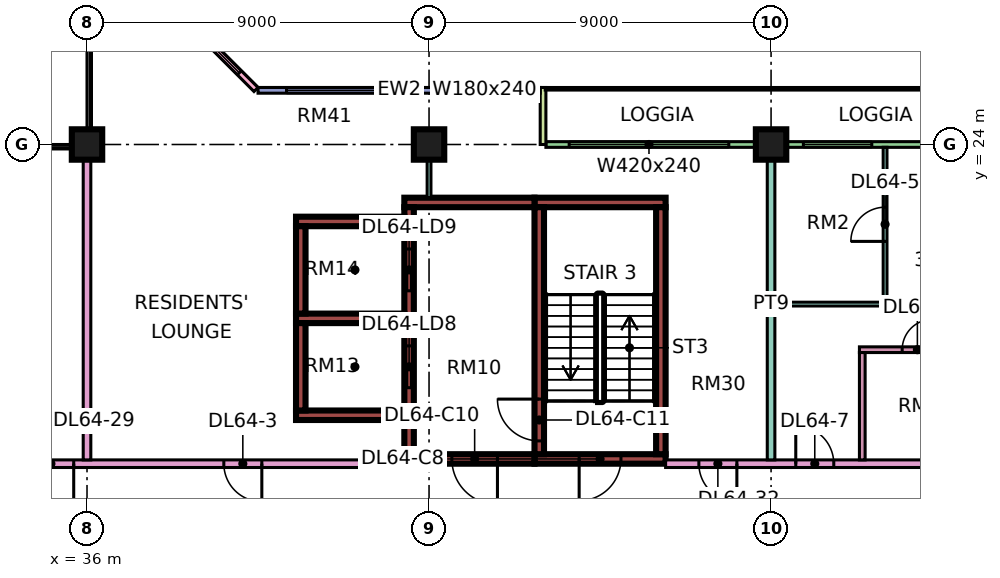
"""IFC4 building model, lengths in metres.
Left out: names, types, materials, properties, quantities, classifications, styles, units other than length and angle.
Written with IfcOpenShell. Run it as: python <this file> out.ifc"""

import sys

from ifc_helpers import new_model, si_unit, direction, frame, frame_2d, origin, origin_2d, place, context, subcontext, project, spatial, rectangle, extrude, element, fill, save


model = new_model("IFC4")
c1 = context("Model", 3, precision=1e-05, world=origin(), true_north=direction((0.0, 1.0)))
c2 = subcontext(c1, "Body", "Model", "MODEL_VIEW")
j1 = project(units=[si_unit("LENGTHUNIT", "METRE"), si_unit("PLANEANGLEUNIT", "RADIAN")], contexts=[c1])
p1 = place(None, origin())
s1 = spatial("IfcSite", under=j1, at=p1, CompositionType="ELEMENT")
p2 = place(p1, origin())
s2 = spatial("IfcBuilding", under=s1, at=p2, CompositionType="ELEMENT")
p3 = place(p2, frame((0.0, 0.0, 277.15)))
s3 = spatial("IfcBuildingStorey", under=s2, at=p3, CompositionType="ELEMENT", Elevation=277.15)
for number, where, z_axis, x_axis in (
    (1, (36.0, 24.0, 0.0), (0.0, 0.0, 1.0), (1.0, 0.0, 0.0)),
    (2, (45.0, 24.0, 0.0), (0.0, 0.0, 1.0), (1.0, 0.0, 0.0)),
    (3, (54.0, 24.0, 0.0), (0.0, 0.0, 1.0), (1.0, 0.0, 0.0)),
):
    element("IfcColumn", number, at=place(p3, frame(where, z_axis=z_axis, x_axis=x_axis)), inside=s3, PredefinedType="COLUMN", context=c2, shape_type="SweptSolid", body=[
        extrude(rectangle(XDim=0.8, YDim=0.8, at=origin_2d()), origin(), (0.0, 0.0, 1.0), 3.75),
    ])
p4 = place(p3, frame((47.775, 15.725, 0.0), z_axis=(0.0, 0.0, 1.0), x_axis=(1.0, 0.0, 0.0)))
e4 = element("IfcWall", 4, at=p4, inside=s3, PredefinedType="SHEAR", context=c2, shape_type="SweptSolid", body=[
    extrude(rectangle(XDim=3.45, YDim=0.25, at=frame_2d((1.725, 0.0))), origin(), (0.0, 0.0, 1.0), 3.75),
])
p5 = place(p4, frame((1.175, 0.0, 0.0)))
e5 = element("IfcOpeningElement", 5, at=p5, cuts=e4, PredefinedType="OPENING", context=c2, shape_type="SweptSolid", body=[
    extrude(rectangle(XDim=1.1, YDim=2.2, at=frame_2d((0.55, 1.1))), frame((0.0, 0.135, 0.0), z_axis=(0.0, -1.0, 0.0), x_axis=(1.0, 0.0, 0.0)), (0.0, 0.0, 1.0), 0.27),
])
p6 = place(p3, frame((47.775, 22.475, 0.0), z_axis=(0.0, 0.0, 1.0), x_axis=(1.0, 0.0, 0.0)))
e6 = element("IfcWall", 6, at=p6, inside=s3, PredefinedType="SHEAR", context=c2, shape_type="SweptSolid", body=[
    extrude(rectangle(XDim=3.45, YDim=0.25, at=frame_2d((1.725, 0.0))), origin(), (0.0, 0.0, 1.0), 3.75),
])
p7 = place(p3, frame((47.9, 15.85, 0.0), z_axis=(0.0, 0.0, 1.0), x_axis=(0.0, 1.0, 0.0)))
e7 = element("IfcWall", 7, at=p7, inside=s3, PredefinedType="SHEAR", context=c2, shape_type="SweptSolid", body=[
    extrude(rectangle(XDim=6.5, YDim=0.25, at=frame_2d((3.25, 0.0))), origin(), (0.0, 0.0, 1.0), 3.75),
])
p8 = place(p7, frame((0.35, 0.0, 0.0)))
e8 = element("IfcOpeningElement", 8, at=p8, cuts=e7, PredefinedType="OPENING", context=c2, shape_type="SweptSolid", body=[
    extrude(rectangle(XDim=1.1, YDim=2.2, at=frame_2d((0.55, 1.1))), frame((0.0, 0.135, 0.0), z_axis=(0.0, -1.0, 0.0), x_axis=(1.0, 0.0, 0.0)), (0.0, 0.0, 1.0), 0.27),
])
p9 = place(p3, frame((51.1, 15.85, 0.0), z_axis=(0.0, 0.0, 1.0), x_axis=(0.0, 1.0, 0.0)))
e9 = element("IfcWall", 9, at=p9, inside=s3, PredefinedType="SHEAR", context=c2, shape_type="SweptSolid", body=[
    extrude(rectangle(XDim=6.5, YDim=0.25, at=frame_2d((3.25, 0.0))), origin(), (0.0, 0.0, 1.0), 3.75),
])
p10 = place(p3, frame((44.35, 15.725, 0.0), z_axis=(0.0, 0.0, 1.0), x_axis=(1.0, 0.0, 0.0)))
e10 = element("IfcWall", 10, at=p10, inside=s3, PredefinedType="SHEAR", context=c2, shape_type="SweptSolid", body=[
    extrude(rectangle(XDim=3.425, YDim=0.25, at=frame_2d((1.712, 0.0))), origin(), (0.0, 0.0, 1.0), 3.75),
])
p11 = place(p10, frame((1.25, 0.0, 0.0)))
e11 = element("IfcOpeningElement", 11, at=p11, cuts=e10, PredefinedType="OPENING", context=c2, shape_type="SweptSolid", body=[
    extrude(rectangle(XDim=1.2, YDim=2.2, at=frame_2d((0.6, 1.1))), frame((0.0, 0.135, 0.0), z_axis=(0.0, -1.0, 0.0), x_axis=(1.0, 0.0, 0.0)), (0.0, 0.0, 1.0), 0.27),
])
p12 = place(p3, frame((44.35, 22.475, 0.0), z_axis=(0.0, 0.0, 1.0), x_axis=(1.0, 0.0, 0.0)))
e12 = element("IfcWall", 12, at=p12, inside=s3, PredefinedType="SHEAR", context=c2, shape_type="SweptSolid", body=[
    extrude(rectangle(XDim=3.425, YDim=0.25, at=frame_2d((1.712, 0.0))), origin(), (0.0, 0.0, 1.0), 3.75),
])
p13 = place(p3, frame((44.475, 15.85, 0.0), z_axis=(0.0, 0.0, 1.0), x_axis=(0.0, 1.0, 0.0)))
e13 = element("IfcWall", 13, at=p13, inside=s3, PredefinedType="SHEAR", context=c2, shape_type="SweptSolid", body=[
    extrude(rectangle(XDim=6.5, YDim=0.25, at=frame_2d((3.25, 0.0))), origin(), (0.0, 0.0, 1.0), 3.75),
])
p14 = place(p13, frame((1.75, 0.0, 0.0)))
e14 = element("IfcOpeningElement", 14, at=p14, cuts=e13, PredefinedType="OPENING", context=c2, shape_type="SweptSolid", body=[
    extrude(rectangle(XDim=1.1, YDim=2.2, at=frame_2d((0.55, 1.1))), frame((0.0, 0.135, 0.0), z_axis=(0.0, -1.0, 0.0), x_axis=(1.0, 0.0, 0.0)), (0.0, 0.0, 1.0), 0.27),
])
p15 = place(p13, frame((4.3, 0.0, 0.0)))
e15 = element("IfcOpeningElement", 15, at=p15, cuts=e13, PredefinedType="OPENING", context=c2, shape_type="SweptSolid", body=[
    extrude(rectangle(XDim=1.1, YDim=2.2, at=frame_2d((0.55, 1.1))), frame((0.0, 0.135, 0.0), z_axis=(0.0, -1.0, 0.0), x_axis=(1.0, 0.0, 0.0)), (0.0, 0.0, 1.0), 0.27),
])
for number, where, z_axis, x_axis in (
    (16, (41.5, 16.875, 0.0), (0.0, 0.0, 1.0), (1.0, 0.0, 0.0)),
    (17, (41.5, 19.425, 0.0), (0.0, 0.0, 1.0), (1.0, 0.0, 0.0)),
    (18, (41.5, 21.975, 0.0), (0.0, 0.0, 1.0), (1.0, 0.0, 0.0)),
):
    element("IfcWall", number, at=place(p3, frame(where, z_axis=z_axis, x_axis=x_axis)), inside=s3, PredefinedType="SHEAR", context=c2, shape_type="SweptSolid", body=[
        extrude(rectangle(XDim=2.85, YDim=0.25, at=frame_2d((1.425, 0.0))), origin(), (0.0, 0.0, 1.0), 3.75),
    ])
for number, where, z_axis, x_axis in (
    (19, (41.625, 17.0, 0.0), (0.0, 0.0, 1.0), (0.0, 1.0, 0.0)),
    (20, (41.625, 19.55, 0.0), (0.0, 0.0, 1.0), (0.0, 1.0, 0.0)),
):
    element("IfcWall", number, at=place(p3, frame(where, z_axis=z_axis, x_axis=x_axis)), inside=s3, PredefinedType="SHEAR", context=c2, shape_type="SweptSolid", body=[
        extrude(rectangle(XDim=2.3, YDim=0.25, at=frame_2d((1.15, 0.0))), origin(), (0.0, 0.0, 1.0), 3.75),
    ])
p16 = place(p3, frame((61.425, 24.0, 0.0), z_axis=(0.0, 0.0, 1.0), x_axis=(-1.0, 0.0, 0.0)))
e21 = element("IfcWall", 21, at=p16, inside=s3, PredefinedType="SOLIDWALL", context=c2, shape_type="SweptSolid", body=[
    extrude(rectangle(XDim=13.35, YDim=0.15, at=frame_2d((6.675, 0.0))), origin(), (0.0, 0.0, 1.0), 3.35),
])
p17 = place(p16, frame((1.312, 0.0, 0.0)))
e22 = element("IfcOpeningElement", 22, at=p17, cuts=e21, PredefinedType="OPENING", context=c2, shape_type="SweptSolid", body=[
    extrude(rectangle(XDim=1.8, YDim=2.4, at=frame_2d((0.9, 1.2))), frame((0.0, 0.085, 0.0), z_axis=(0.0, -1.0, 0.0), x_axis=(1.0, 0.0, 0.0)), (0.0, 0.0, 1.0), 0.17),
])
p18 = place(p16, frame((4.775, 0.0, 0.45)))
e23 = element("IfcOpeningElement", 23, at=p18, cuts=e21, PredefinedType="OPENING", context=c2, shape_type="SweptSolid", body=[
    extrude(rectangle(XDim=1.8, YDim=2.4, at=frame_2d((0.9, 1.2))), frame((0.0, 0.085, 0.0), z_axis=(0.0, -1.0, 0.0), x_axis=(1.0, 0.0, 0.0)), (0.0, 0.0, 1.0), 0.17),
])
p19 = place(p16, frame((8.538, 0.0, 0.45)))
e24 = element("IfcOpeningElement", 24, at=p19, cuts=e21, PredefinedType="OPENING", context=c2, shape_type="SweptSolid", body=[
    extrude(rectangle(XDim=4.2, YDim=2.4, at=frame_2d((2.1, 1.2))), frame((0.0, 0.085, 0.0), z_axis=(0.0, -1.0, 0.0), x_axis=(1.0, 0.0, 0.0)), (0.0, 0.0, 1.0), 0.17),
])
p20 = place(p3, frame((48.0, 25.5, 0.0), z_axis=(0.0, 0.0, 1.0), x_axis=(0.0, -1.0, 0.0)))
e25 = element("IfcWall", 25, at=p20, inside=s3, PredefinedType="SOLIDWALL", context=c2, shape_type="SweptSolid", body=[
    extrude(rectangle(XDim=1.5, YDim=0.15, at=frame_2d((0.75, 0.0))), origin(), (0.0, 0.0, 1.0), 3.35),
])
p21 = place(p3, frame((47.925, 25.425, 0.0), z_axis=(0.0, 0.0, 1.0), x_axis=(-1.0, 0.0, 0.0)))
e26 = element("IfcWall", 26, at=p21, inside=s3, PredefinedType="SOLIDWALL", context=c2, shape_type="SweptSolid", body=[
    extrude(rectangle(XDim=7.425, YDim=0.15, at=frame_2d((3.712, 0.0))), origin(), (0.0, 0.0, 1.0), 3.35),
])
p22 = place(p21, frame((0.562, 0.0, 0.45)))
e27 = element("IfcOpeningElement", 27, at=p22, cuts=e26, PredefinedType="OPENING", context=c2, shape_type="SweptSolid", body=[
    extrude(rectangle(XDim=1.8, YDim=2.4, at=frame_2d((0.9, 1.2))), frame((0.0, 0.085, 0.0), z_axis=(0.0, -1.0, 0.0), x_axis=(1.0, 0.0, 0.0)), (0.0, 0.0, 1.0), 0.17),
])
p23 = place(p21, frame((3.675, 0.0, 0.45)))
e28 = element("IfcOpeningElement", 28, at=p23, cuts=e26, PredefinedType="OPENING", context=c2, shape_type="SweptSolid", body=[
    extrude(rectangle(XDim=3.0, YDim=2.4, at=frame_2d((1.5, 1.2))), frame((0.0, 0.085, 0.0), z_axis=(0.0, -1.0, 0.0), x_axis=(1.0, 0.0, 0.0)), (0.0, 0.0, 1.0), 0.17),
])
p24 = place(p3, frame((40.447, 25.447, 0.0), z_axis=(0.0, 0.0, 1.0), x_axis=(-0.707106781187, 0.707106781187, 0.0)))
e29 = element("IfcWall", 29, at=p24, inside=s3, PredefinedType="SOLIDWALL", context=c2, shape_type="SweptSolid", body=[
    extrude(rectangle(XDim=4.243, YDim=0.15, at=frame_2d((2.121, 0.0))), origin(), (0.0, 0.0, 1.0), 3.35),
])
p25 = place(p24, frame((0.621, 0.0, 0.45)))
e30 = element("IfcOpeningElement", 30, at=p25, cuts=e29, PredefinedType="OPENING", context=c2, shape_type="SweptSolid", body=[
    extrude(rectangle(XDim=3.0, YDim=2.4, at=frame_2d((1.5, 1.2))), frame((0.0, 0.085, 0.0), z_axis=(0.0, -1.0, 0.0), x_axis=(1.0, 0.0, 0.0)), (0.0, 0.0, 1.0), 0.17),
])
p26 = place(p3, frame((34.0, 15.6, 0.0), z_axis=(0.0, 0.0, 1.0), x_axis=(1.0, 0.0, 0.0)))
e31 = element("IfcWall", 31, at=p26, inside=s3, PredefinedType="PARTITIONING", context=c2, shape_type="SweptSolid", body=[
    extrude(rectangle(XDim=10.35, YDim=0.2, at=frame_2d((5.175, 0.0))), origin(), (0.0, 0.0, 1.0), 3.35),
])
p27 = place(p26, frame((5.6, 0.0, 0.0)))
e32 = element("IfcOpeningElement", 32, at=p27, cuts=e31, PredefinedType="OPENING", context=c2, shape_type="SweptSolid", body=[
    extrude(rectangle(XDim=1.0, YDim=2.1, at=frame_2d((0.5, 1.05))), frame((0.0, 0.11, 0.0), z_axis=(0.0, -1.0, 0.0), x_axis=(1.0, 0.0, 0.0)), (0.0, 0.0, 1.0), 0.22),
])
p28 = place(p26, frame((0.45, 0.0, 0.0)))
e33 = element("IfcOpeningElement", 33, at=p28, cuts=e31, PredefinedType="OPENING", context=c2, shape_type="SweptSolid", body=[
    extrude(rectangle(XDim=1.2, YDim=2.1, at=frame_2d((0.6, 1.05))), frame((0.0, 0.11, 0.0), z_axis=(0.0, -1.0, 0.0), x_axis=(1.0, 0.0, 0.0)), (0.0, 0.0, 1.0), 0.22),
])
p29 = place(p3, frame((36.0, 15.7, 0.0), z_axis=(0.0, 0.0, 1.0), x_axis=(0.0, 1.0, 0.0)))
e34 = element("IfcWall", 34, at=p29, inside=s3, PredefinedType="PARTITIONING", context=c2, shape_type="SweptSolid", body=[
    extrude(rectangle(XDim=8.3, YDim=0.2, at=frame_2d((4.15, 0.0))), origin(), (0.0, 0.0, 1.0), 3.35),
])
p30 = place(p3, frame((45.0, 22.6, 0.0), z_axis=(0.0, 0.0, 1.0), x_axis=(0.0, 1.0, 0.0)))
e35 = element("IfcWall", 35, at=p30, inside=s3, PredefinedType="PARTITIONING", context=c2, shape_type="SweptSolid", body=[
    extrude(rectangle(XDim=1.4, YDim=0.1, at=frame_2d((0.7, 0.0))), origin(), (0.0, 0.0, 1.0), 3.35),
])
p31 = place(p3, frame((51.225, 15.6, 0.0), z_axis=(0.0, 0.0, 1.0), x_axis=(1.0, 0.0, 0.0)))
e36 = element("IfcWall", 36, at=p31, inside=s3, PredefinedType="PARTITIONING", context=c2, shape_type="SweptSolid", body=[
    extrude(rectangle(XDim=13.125, YDim=0.2, at=frame_2d((6.562, 0.0))), origin(), (0.0, 0.0, 1.0), 3.35),
])
p32 = place(p31, frame((3.425, 0.0, 0.0)))
e37 = element("IfcOpeningElement", 37, at=p32, cuts=e36, PredefinedType="OPENING", context=c2, shape_type="SweptSolid", body=[
    extrude(rectangle(XDim=1.0, YDim=2.1, at=frame_2d((0.5, 1.05))), frame((0.0, 0.11, 0.0), z_axis=(0.0, -1.0, 0.0), x_axis=(1.0, 0.0, 0.0)), (0.0, 0.0, 1.0), 0.22),
])
p33 = place(p31, frame((0.875, 0.0, 0.0)))
e38 = element("IfcOpeningElement", 38, at=p33, cuts=e36, PredefinedType="OPENING", context=c2, shape_type="SweptSolid", body=[
    extrude(rectangle(XDim=1.0, YDim=2.1, at=frame_2d((0.5, 1.05))), frame((0.0, 0.11, 0.0), z_axis=(0.0, -1.0, 0.0), x_axis=(1.0, 0.0, 0.0)), (0.0, 0.0, 1.0), 0.22),
])
p34 = place(p3, frame((54.0, 15.7, 0.0), z_axis=(0.0, 0.0, 1.0), x_axis=(0.0, 1.0, 0.0)))
e39 = element("IfcWall", 39, at=p34, inside=s3, PredefinedType="PARTITIONING", context=c2, shape_type="SweptSolid", body=[
    extrude(rectangle(XDim=8.226, YDim=0.2, at=frame_2d((4.113, 0.0))), origin(), (0.0, 0.0, 1.0), 3.35),
])
p35 = place(p3, frame((54.1, 19.8, 0.0), z_axis=(0.0, 0.0, 1.0), x_axis=(1.0, 0.0, 0.0)))
e40 = element("IfcWall", 40, at=p35, inside=s3, PredefinedType="PARTITIONING", context=c2, shape_type="SweptSolid", body=[
    extrude(rectangle(XDim=2.85, YDim=0.1, at=frame_2d((1.425, 0.0))), origin(), (0.0, 0.0, 1.0), 3.35),
])
p36 = place(p3, frame((56.325, 18.6, 0.0), z_axis=(0.0, 0.0, 1.0), x_axis=(1.0, 0.0, 0.0)))
e41 = element("IfcWall", 41, at=p36, inside=s3, PredefinedType="PARTITIONING", context=c2, shape_type="SweptSolid", body=[
    extrude(rectangle(XDim=8.025, YDim=0.15, at=frame_2d((4.013, 0.0))), origin(), (0.0, 0.0, 1.0), 3.35),
])
p37 = place(p36, frame((1.125, 0.0, 0.0)))
e42 = element("IfcOpeningElement", 42, at=p37, cuts=e41, PredefinedType="OPENING", context=c2, shape_type="SweptSolid", body=[
    extrude(rectangle(XDim=0.8, YDim=2.1, at=frame_2d((0.4, 1.05))), frame((0.0, 0.085, 0.0), z_axis=(0.0, -1.0, 0.0), x_axis=(1.0, 0.0, 0.0)), (0.0, 0.0, 1.0), 0.17),
])
p38 = place(p36, frame((4.425, 0.0, 0.0)))
e43 = element("IfcOpeningElement", 43, at=p38, cuts=e41, PredefinedType="OPENING", context=c2, shape_type="SweptSolid", body=[
    extrude(rectangle(XDim=0.9, YDim=2.1, at=frame_2d((0.45, 1.05))), frame((0.0, 0.085, 0.0), z_axis=(0.0, -1.0, 0.0), x_axis=(1.0, 0.0, 0.0)), (0.0, 0.0, 1.0), 0.17),
])
p39 = place(p3, frame((56.4, 15.7, 0.0), z_axis=(0.0, 0.0, 1.0), x_axis=(0.0, 1.0, 0.0)))
e44 = element("IfcWall", 44, at=p39, inside=s3, PredefinedType="PARTITIONING", context=c2, shape_type="SweptSolid", body=[
    extrude(rectangle(XDim=2.825, YDim=0.15, at=frame_2d((1.413, 0.0))), origin(), (0.0, 0.0, 1.0), 3.35),
])
p40 = place(p3, frame((57.0, 19.75, 0.0), z_axis=(0.0, 0.0, 1.0), x_axis=(0.0, 1.0, 0.0)))
e45 = element("IfcWall", 45, at=p40, inside=s3, PredefinedType="PARTITIONING", context=c2, shape_type="SweptSolid", body=[
    extrude(rectangle(XDim=4.176, YDim=0.1, at=frame_2d((2.088, 0.0))), origin(), (0.0, 0.0, 1.0), 3.35),
])
p41 = place(p40, frame((1.7, 0.0, 0.0)))
e46 = element("IfcOpeningElement", 46, at=p41, cuts=e45, PredefinedType="OPENING", context=c2, shape_type="SweptSolid", body=[
    extrude(rectangle(XDim=0.9, YDim=2.1, at=frame_2d((0.45, 1.05))), frame((0.0, 0.06, 0.0), z_axis=(0.0, -1.0, 0.0), x_axis=(1.0, 0.0, 0.0)), (0.0, 0.0, 1.0), 0.12),
])
p42 = place(p18, origin())
e47 = element("IfcWindow", 47, at=p42, inside=s3, PartitioningType="SINGLE_PANEL", PredefinedType="WINDOW", context=c2, shape_type="SweptSolid", body=[
    extrude(rectangle(XDim=1.8, YDim=2.4, at=frame_2d((0.9, 1.2))), frame((0.0, 0.03, 0.0), z_axis=(0.0, -1.0, 0.0), x_axis=(1.0, 0.0, 0.0)), (0.0, 0.0, 1.0), 0.06),
])
fill(e23, e47)
p43 = place(p19, origin())
e48 = element("IfcWindow", 48, at=p43, inside=s3, PartitioningType="SINGLE_PANEL", PredefinedType="WINDOW", context=c2, shape_type="SweptSolid", body=[
    extrude(rectangle(XDim=4.2, YDim=2.4, at=frame_2d((2.1, 1.2))), frame((0.0, 0.03, 0.0), z_axis=(0.0, -1.0, 0.0), x_axis=(1.0, 0.0, 0.0)), (0.0, 0.0, 1.0), 0.06),
])
fill(e24, e48)
p44 = place(p22, origin())
e49 = element("IfcWindow", 49, at=p44, inside=s3, PartitioningType="SINGLE_PANEL", PredefinedType="WINDOW", context=c2, shape_type="SweptSolid", body=[
    extrude(rectangle(XDim=1.8, YDim=2.4, at=frame_2d((0.9, 1.2))), frame((0.0, 0.03, 0.0), z_axis=(0.0, -1.0, 0.0), x_axis=(1.0, 0.0, 0.0)), (0.0, 0.0, 1.0), 0.06),
])
fill(e27, e49)
p45 = place(p23, origin())
e50 = element("IfcWindow", 50, at=p45, inside=s3, PartitioningType="SINGLE_PANEL", PredefinedType="WINDOW", context=c2, shape_type="SweptSolid", body=[
    extrude(rectangle(XDim=3.0, YDim=2.4, at=frame_2d((1.5, 1.2))), frame((0.0, 0.03, 0.0), z_axis=(0.0, -1.0, 0.0), x_axis=(1.0, 0.0, 0.0)), (0.0, 0.0, 1.0), 0.06),
])
fill(e28, e50)
p46 = place(p25, origin())
e51 = element("IfcWindow", 51, at=p46, inside=s3, PartitioningType="SINGLE_PANEL", PredefinedType="WINDOW", context=c2, shape_type="SweptSolid", body=[
    extrude(rectangle(XDim=3.0, YDim=2.4, at=frame_2d((1.5, 1.2))), frame((0.0, 0.03, 0.0), z_axis=(0.0, -1.0, 0.0), x_axis=(1.0, 0.0, 0.0)), (0.0, 0.0, 1.0), 0.06),
])
fill(e30, e51)
p47 = place(p5, frame((1.1, 0.0, 0.0), z_axis=(0.0, 0.0, 1.0), x_axis=(-1.0, 0.0, 0.0)))
e52 = element("IfcDoor", 52, at=p47, inside=s3, OperationType="SINGLE_SWING_LEFT", PredefinedType="DOOR", context=c2, shape_type="SweptSolid", body=[
    extrude(rectangle(XDim=1.1, YDim=2.2, at=frame_2d((0.55, 1.1))), frame((0.0, 0.025, 0.0), z_axis=(0.0, -1.0, 0.0), x_axis=(1.0, 0.0, 0.0)), (0.0, 0.0, 1.0), 0.05),
])
fill(e5, e52)
p48 = place(p11, origin())
e53 = element("IfcDoor", 53, at=p48, inside=s3, OperationType="SINGLE_SWING_RIGHT", PredefinedType="DOOR", context=c2, shape_type="SweptSolid", body=[
    extrude(rectangle(XDim=1.2, YDim=2.2, at=frame_2d((0.6, 1.1))), frame((0.0, 0.025, 0.0), z_axis=(0.0, -1.0, 0.0), x_axis=(1.0, 0.0, 0.0)), (0.0, 0.0, 1.0), 0.05),
])
fill(e11, e53)
p49 = place(p8, frame((1.1, 0.0, 0.0), z_axis=(0.0, 0.0, 1.0), x_axis=(-1.0, 0.0, 0.0)))
e54 = element("IfcDoor", 54, at=p49, inside=s3, OperationType="SINGLE_SWING_RIGHT", PredefinedType="DOOR", context=c2, shape_type="SweptSolid", body=[
    extrude(rectangle(XDim=1.1, YDim=2.2, at=frame_2d((0.55, 1.1))), frame((0.0, 0.025, 0.0), z_axis=(0.0, -1.0, 0.0), x_axis=(1.0, 0.0, 0.0)), (0.0, 0.0, 1.0), 0.05),
])
fill(e8, e54)
p50 = place(p14, origin())
e55 = element("IfcDoor", 55, at=p50, inside=s3, OperationType="DOUBLE_DOOR_SLIDING", PredefinedType="DOOR", context=c2, shape_type="SweptSolid", body=[
    extrude(rectangle(XDim=1.1, YDim=2.2, at=frame_2d((0.55, 1.1))), frame((0.0, 0.025, 0.0), z_axis=(0.0, -1.0, 0.0), x_axis=(1.0, 0.0, 0.0)), (0.0, 0.0, 1.0), 0.05),
])
fill(e14, e55)
p51 = place(p15, origin())
e56 = element("IfcDoor", 56, at=p51, inside=s3, OperationType="DOUBLE_DOOR_SLIDING", PredefinedType="DOOR", context=c2, shape_type="SweptSolid", body=[
    extrude(rectangle(XDim=1.1, YDim=2.2, at=frame_2d((0.55, 1.1))), frame((0.0, 0.025, 0.0), z_axis=(0.0, -1.0, 0.0), x_axis=(1.0, 0.0, 0.0)), (0.0, 0.0, 1.0), 0.05),
])
fill(e15, e56)
p52 = place(p27, origin())
e57 = element("IfcDoor", 57, at=p52, inside=s3, OperationType="SINGLE_SWING_RIGHT", PredefinedType="DOOR", context=c2, shape_type="SweptSolid", body=[
    extrude(rectangle(XDim=1.0, YDim=2.1, at=frame_2d((0.5, 1.05))), frame((0.0, 0.025, 0.0), z_axis=(0.0, -1.0, 0.0), x_axis=(1.0, 0.0, 0.0)), (0.0, 0.0, 1.0), 0.05),
])
fill(e32, e57)
p53 = place(p37, frame((0.8, 0.0, 0.0), z_axis=(0.0, 0.0, 1.0), x_axis=(-1.0, 0.0, 0.0)))
e58 = element("IfcDoor", 58, at=p53, inside=s3, OperationType="SINGLE_SWING_RIGHT", PredefinedType="DOOR", context=c2, shape_type="SweptSolid", body=[
    extrude(rectangle(XDim=0.8, YDim=2.1, at=frame_2d((0.4, 1.05))), frame((0.0, 0.025, 0.0), z_axis=(0.0, -1.0, 0.0), x_axis=(1.0, 0.0, 0.0)), (0.0, 0.0, 1.0), 0.05),
])
fill(e42, e58)
p54 = place(p41, origin())
e59 = element("IfcDoor", 59, at=p54, inside=s3, OperationType="SINGLE_SWING_LEFT", PredefinedType="DOOR", context=c2, shape_type="SweptSolid", body=[
    extrude(rectangle(XDim=0.9, YDim=2.1, at=frame_2d((0.45, 1.05))), frame((0.0, 0.025, 0.0), z_axis=(0.0, -1.0, 0.0), x_axis=(1.0, 0.0, 0.0)), (0.0, 0.0, 1.0), 0.05),
])
fill(e46, e59)
p55 = place(p32, origin())
e60 = element("IfcDoor", 60, at=p55, inside=s3, OperationType="SINGLE_SWING_LEFT", PredefinedType="DOOR", context=c2, shape_type="SweptSolid", body=[
    extrude(rectangle(XDim=1.0, YDim=2.1, at=frame_2d((0.5, 1.05))), frame((0.0, 0.025, 0.0), z_axis=(0.0, -1.0, 0.0), x_axis=(1.0, 0.0, 0.0)), (0.0, 0.0, 1.0), 0.05),
])
fill(e37, e60)
p56 = place(p28, origin())
e61 = element("IfcDoor", 61, at=p56, inside=s3, OperationType="SINGLE_SWING_RIGHT", PredefinedType="DOOR", context=c2, shape_type="SweptSolid", body=[
    extrude(rectangle(XDim=1.2, YDim=2.1, at=frame_2d((0.6, 1.05))), frame((0.0, 0.025, 0.0), z_axis=(0.0, -1.0, 0.0), x_axis=(1.0, 0.0, 0.0)), (0.0, 0.0, 1.0), 0.05),
])
fill(e33, e61)
p57 = place(p33, origin())
e62 = element("IfcDoor", 62, at=p57, inside=s3, OperationType="SINGLE_SWING_RIGHT", PredefinedType="DOOR", context=c2, shape_type="SweptSolid", body=[
    extrude(rectangle(XDim=1.0, YDim=2.1, at=frame_2d((0.5, 1.05))), frame((0.0, 0.025, 0.0), z_axis=(0.0, -1.0, 0.0), x_axis=(1.0, 0.0, 0.0)), (0.0, 0.0, 1.0), 0.05),
])
fill(e38, e62)
save(model, sys.argv[1])
